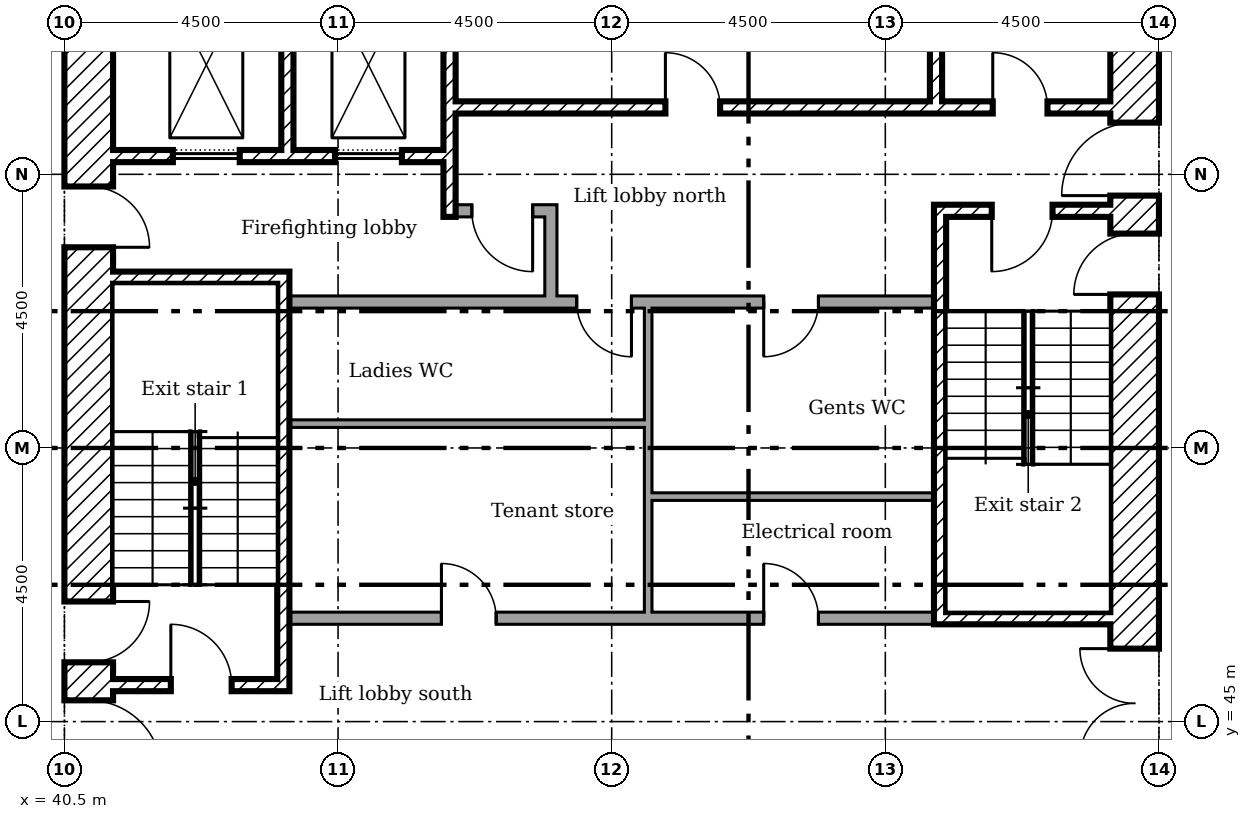
"""IFC4 building model, lengths in metres.
Left out: names, types, materials, properties, quantities, classifications, styles, units other than length and angle.
Written with IfcOpenShell. Run it as: python <this file> out.ifc"""

import sys

from ifc_helpers import new_model, si_unit, direction, frame, frame_2d, origin, place, context, subcontext, project, spatial, rectangle, extrude, element, fill, save


model = new_model("IFC4")
c1 = context("Model", 3, precision=1e-05, world=origin(), true_north=direction((0.0, 1.0)))
c2 = subcontext(c1, "Body", "Model", "MODEL_VIEW")
j1 = project(units=[si_unit("LENGTHUNIT", "METRE"), si_unit("PLANEANGLEUNIT", "RADIAN")], contexts=[c1])
p1 = place(None, origin())
s1 = spatial("IfcSite", under=j1, at=p1, CompositionType="ELEMENT")
p2 = place(p1, origin())
s2 = spatial("IfcBuilding", under=s1, at=p2, CompositionType="ELEMENT")
p3 = place(p2, frame((0.0, 0.0, 54.6)))
s3 = spatial("IfcBuildingStorey", under=s2, at=p3, CompositionType="ELEMENT", Elevation=54.6)
p4 = place(p3, frame((58.1, 40.5, 0.0), z_axis=(0.0, 0.0, 1.0), x_axis=(0.0, 1.0, 0.0)))
e1 = element("IfcWall", 1, at=p4, inside=s3, PredefinedType="SHEAR", context=c2, shape_type="SweptSolid", body=[
    extrude(rectangle(XDim=18.0, YDim=0.8, at=frame_2d((9.0, 0.0))), origin(), (0.0, 0.0, 1.0), 3.35),
])
p5 = place(p4, frame((13.15, 0.0, 0.0)))
e2 = element("IfcOpeningElement", 2, at=p5, cuts=e1, PredefinedType="OPENING", context=c2, shape_type="SweptSolid", body=[
    extrude(rectangle(XDim=1.2, YDim=2.1, at=frame_2d((0.6, 1.05))), frame((0.0, 0.41, 0.0), z_axis=(0.0, -1.0, 0.0), x_axis=(1.0, 0.0, 0.0)), (0.0, 0.0, 1.0), 0.82),
])
p6 = place(p4, frame((3.9, 0.0, 0.0)))
e3 = element("IfcOpeningElement", 3, at=p6, cuts=e1, PredefinedType="OPENING", context=c2, shape_type="SweptSolid", body=[
    extrude(rectangle(XDim=1.8, YDim=2.1, at=frame_2d((0.9, 1.05))), frame((0.0, 0.41, 0.0), z_axis=(0.0, -1.0, 0.0), x_axis=(1.0, 0.0, 0.0)), (0.0, 0.0, 1.0), 0.82),
])
p7 = place(p4, frame((11.525, 0.0, 0.0)))
e4 = element("IfcOpeningElement", 4, at=p7, cuts=e1, PredefinedType="OPENING", context=c2, shape_type="SweptSolid", body=[
    extrude(rectangle(XDim=1.0, YDim=2.1, at=frame_2d((0.5, 1.05))), frame((0.0, 0.41, 0.0), z_axis=(0.0, -1.0, 0.0), x_axis=(1.0, 0.0, 0.0)), (0.0, 0.0, 1.0), 0.82),
])
p8 = place(p3, frame((40.9, 40.5, 0.0), z_axis=(0.0, 0.0, 1.0), x_axis=(0.0, 1.0, 0.0)))
e5 = element("IfcWall", 5, at=p8, inside=s3, PredefinedType="SHEAR", context=c2, shape_type="SweptSolid", body=[
    extrude(rectangle(XDim=18.0, YDim=0.8, at=frame_2d((9.0, 0.0))), origin(), (0.0, 0.0, 1.0), 3.35),
])
p9 = place(p8, frame((3.65, 0.0, 0.0)))
e6 = element("IfcOpeningElement", 6, at=p9, cuts=e5, PredefinedType="OPENING", context=c2, shape_type="SweptSolid", body=[
    extrude(rectangle(XDim=1.2, YDim=2.1, at=frame_2d((0.6, 1.05))), frame((0.0, 0.41, 0.0), z_axis=(0.0, -1.0, 0.0), x_axis=(1.0, 0.0, 0.0)), (0.0, 0.0, 1.0), 0.82),
])
p10 = place(p8, frame((5.475, 0.0, 0.0)))
e7 = element("IfcOpeningElement", 7, at=p10, cuts=e5, PredefinedType="OPENING", context=c2, shape_type="SweptSolid", body=[
    extrude(rectangle(XDim=1.0, YDim=2.1, at=frame_2d((0.5, 1.05))), frame((0.0, 0.41, 0.0), z_axis=(0.0, -1.0, 0.0), x_axis=(1.0, 0.0, 0.0)), (0.0, 0.0, 1.0), 0.82),
])
p11 = place(p8, frame((12.3, 0.0, 0.0)))
e8 = element("IfcOpeningElement", 8, at=p11, cuts=e5, PredefinedType="OPENING", context=c2, shape_type="SweptSolid", body=[
    extrude(rectangle(XDim=1.0, YDim=2.1, at=frame_2d((0.5, 1.05))), frame((0.0, 0.41, 0.0), z_axis=(0.0, -1.0, 0.0), x_axis=(1.0, 0.0, 0.0)), (0.0, 0.0, 1.0), 0.82),
])
p12 = place(p3, frame((44.167, 57.7, 0.0), z_axis=(0.0, 0.0, 1.0), x_axis=(0.0, -1.0, 0.0)))
e9 = element("IfcWall", 9, at=p12, inside=s3, PredefinedType="SHEAR", context=c2, shape_type="SweptSolid", body=[
    extrude(rectangle(XDim=3.3, YDim=0.2, at=frame_2d((1.65, 0.0))), origin(), (0.0, 0.0, 1.0), 3.35),
])
p13 = place(p3, frame((46.833, 57.7, 0.0), z_axis=(0.0, 0.0, 1.0), x_axis=(0.0, -1.0, 0.0)))
e10 = element("IfcWall", 10, at=p13, inside=s3, PredefinedType="SHEAR", context=c2, shape_type="SweptSolid", body=[
    extrude(rectangle(XDim=4.4, YDim=0.2, at=frame_2d((2.2, 0.0))), origin(), (0.0, 0.0, 1.0), 3.35),
])
p14 = place(p3, frame((54.833, 57.7, 0.0), z_axis=(0.0, 0.0, 1.0), x_axis=(0.0, -1.0, 0.0)))
e11 = element("IfcWall", 11, at=p14, inside=s3, PredefinedType="SHEAR", context=c2, shape_type="SweptSolid", body=[
    extrude(rectangle(XDim=2.5, YDim=0.2, at=frame_2d((1.25, 0.0))), origin(), (0.0, 0.0, 1.0), 3.35),
])
p15 = place(p3, frame((48.5, 51.9, 0.0), z_axis=(0.0, 0.0, 1.0), x_axis=(0.0, 1.0, 0.0)))
e12 = element("IfcWall", 12, at=p15, inside=s3, PredefinedType="PARTITIONING", context=c2, shape_type="SweptSolid", body=[
    extrude(rectangle(XDim=1.6, YDim=0.2, at=frame_2d((0.8, 0.0))), origin(), (0.0, 0.0, 1.0), 3.35),
])
p16 = place(p3, frame((46.933, 53.4, 0.0)))
e13 = element("IfcWall", 13, at=p16, inside=s3, PredefinedType="PARTITIONING", context=c2, shape_type="SweptSolid", body=[
    extrude(rectangle(XDim=1.467, YDim=0.2, at=frame_2d((0.733, 0.0))), origin(), (0.0, 0.0, 1.0), 3.35),
])
p17 = place(p16, frame((0.267, 0.0, 0.0)))
e14 = element("IfcOpeningElement", 14, at=p17, cuts=e13, PredefinedType="OPENING", context=c2, shape_type="SweptSolid", body=[
    extrude(rectangle(XDim=1.0, YDim=2.1, at=frame_2d((0.5, 1.05))), frame((0.0, 0.11, 0.0), z_axis=(0.0, -1.0, 0.0), x_axis=(1.0, 0.0, 0.0)), (0.0, 0.0, 1.0), 0.22),
])
p18 = place(p3, frame((46.933, 55.1, 0.0)))
e15 = element("IfcWall", 15, at=p18, inside=s3, PredefinedType="SHEAR", context=c2, shape_type="SweptSolid", body=[
    extrude(rectangle(XDim=10.767, YDim=0.2, at=frame_2d((5.383, 0.0))), origin(), (0.0, 0.0, 1.0), 3.35),
])
p19 = place(p18, frame((8.833, 0.0, 0.0)))
e16 = element("IfcOpeningElement", 16, at=p19, cuts=e15, PredefinedType="OPENING", context=c2, shape_type="SweptSolid", body=[
    extrude(rectangle(XDim=0.9, YDim=2.1, at=frame_2d((0.45, 1.05))), frame((0.0, 0.11, 0.0), z_axis=(0.0, -1.0, 0.0), x_axis=(1.0, 0.0, 0.0)), (0.0, 0.0, 1.0), 0.22),
])
p20 = place(p18, frame((3.45, 0.0, 0.0)))
e17 = element("IfcOpeningElement", 17, at=p20, cuts=e15, PredefinedType="OPENING", context=c2, shape_type="SweptSolid", body=[
    extrude(rectangle(XDim=0.9, YDim=2.1, at=frame_2d((0.45, 1.05))), frame((0.0, 0.11, 0.0), z_axis=(0.0, -1.0, 0.0), x_axis=(1.0, 0.0, 0.0)), (0.0, 0.0, 1.0), 0.22),
])
p21 = place(p3, frame((41.3, 54.3, 0.0)))
e18 = element("IfcWall", 18, at=p21, inside=s3, PredefinedType="SHEAR", context=c2, shape_type="SweptSolid", body=[
    extrude(rectangle(XDim=5.433, YDim=0.2, at=frame_2d((2.717, 0.0))), origin(), (0.0, 0.0, 1.0), 3.35),
])
p22 = place(p21, frame((0.983, 0.0, 0.0)))
e19 = element("IfcOpeningElement", 19, at=p22, cuts=e18, PredefinedType="OPENING", context=c2, shape_type="SweptSolid", body=[
    extrude(rectangle(XDim=1.1, YDim=2.1, at=frame_2d((0.55, 1.05))), frame((0.0, 0.11, 0.0), z_axis=(0.0, -1.0, 0.0), x_axis=(1.0, 0.0, 0.0)), (0.0, 0.0, 1.0), 0.22),
])
p23 = place(p21, frame((3.65, 0.0, 0.0)))
e20 = element("IfcOpeningElement", 20, at=p23, cuts=e18, PredefinedType="OPENING", context=c2, shape_type="SweptSolid", body=[
    extrude(rectangle(XDim=1.1, YDim=2.1, at=frame_2d((0.55, 1.05))), frame((0.0, 0.11, 0.0), z_axis=(0.0, -1.0, 0.0), x_axis=(1.0, 0.0, 0.0)), (0.0, 0.0, 1.0), 0.22),
])
p24 = place(p3, frame((44.1, 45.5, 0.0), z_axis=(0.0, 0.0, 1.0), x_axis=(0.0, 1.0, 0.0)))
e21 = element("IfcWall", 21, at=p24, inside=s3, PredefinedType="SHEAR", context=c2, shape_type="SweptSolid", body=[
    extrude(rectangle(XDim=6.9, YDim=0.2, at=frame_2d((3.45, 0.0))), origin(), (0.0, 0.0, 1.0), 3.35),
])
p25 = place(p3, frame((41.3, 52.3, 0.0)))
e22 = element("IfcWall", 22, at=p25, inside=s3, PredefinedType="SHEAR", context=c2, shape_type="SweptSolid", body=[
    extrude(rectangle(XDim=2.7, YDim=0.2, at=frame_2d((1.35, 0.0))), origin(), (0.0, 0.0, 1.0), 3.35),
])
p26 = place(p3, frame((41.3, 45.6, 0.0)))
e23 = element("IfcWall", 23, at=p26, inside=s3, PredefinedType="SHEAR", context=c2, shape_type="SweptSolid", body=[
    extrude(rectangle(XDim=2.7, YDim=0.2, at=frame_2d((1.35, 0.0))), origin(), (0.0, 0.0, 1.0), 3.35),
])
p27 = place(p26, frame((0.95, 0.0, 0.0)))
e24 = element("IfcOpeningElement", 24, at=p27, cuts=e23, PredefinedType="OPENING", context=c2, shape_type="SweptSolid", body=[
    extrude(rectangle(XDim=1.0, YDim=2.1, at=frame_2d((0.5, 1.05))), frame((0.0, 0.11, 0.0), z_axis=(0.0, -1.0, 0.0), x_axis=(1.0, 0.0, 0.0)), (0.0, 0.0, 1.0), 0.22),
])
p28 = place(p3, frame((54.8, 53.4, 0.0)))
e25 = element("IfcWall", 25, at=p28, inside=s3, PredefinedType="SHEAR", context=c2, shape_type="SweptSolid", body=[
    extrude(rectangle(XDim=2.9, YDim=0.2, at=frame_2d((1.45, 0.0))), origin(), (0.0, 0.0, 1.0), 3.35),
])
p29 = place(p28, frame((0.95, 0.0, 0.0)))
e26 = element("IfcOpeningElement", 26, at=p29, cuts=e25, PredefinedType="OPENING", context=c2, shape_type="SweptSolid", body=[
    extrude(rectangle(XDim=1.0, YDim=2.1, at=frame_2d((0.5, 1.05))), frame((0.0, 0.11, 0.0), z_axis=(0.0, -1.0, 0.0), x_axis=(1.0, 0.0, 0.0)), (0.0, 0.0, 1.0), 0.22),
])
p30 = place(p3, frame((54.8, 46.7, 0.0)))
e27 = element("IfcWall", 27, at=p30, inside=s3, PredefinedType="SHEAR", context=c2, shape_type="SweptSolid", body=[
    extrude(rectangle(XDim=2.9, YDim=0.2, at=frame_2d((1.45, 0.0))), origin(), (0.0, 0.0, 1.0), 3.35),
])
p31 = place(p3, frame((54.9, 46.8, 0.0), z_axis=(0.0, 0.0, 1.0), x_axis=(0.0, 1.0, 0.0)))
e28 = element("IfcWall", 28, at=p31, inside=s3, PredefinedType="SHEAR", context=c2, shape_type="SweptSolid", body=[
    extrude(rectangle(XDim=6.5, YDim=0.2, at=frame_2d((3.25, 0.0))), origin(), (0.0, 0.0, 1.0), 3.35),
])
p32 = place(p3, frame((44.2, 51.9, 0.0)))
e29 = element("IfcWall", 29, at=p32, inside=s3, PredefinedType="PARTITIONING", context=c2, shape_type="SweptSolid", body=[
    extrude(rectangle(XDim=10.6, YDim=0.2, at=frame_2d((5.3, 0.0))), origin(), (0.0, 0.0, 1.0), 3.35),
])
p33 = place(p32, frame((4.725, 0.0, 0.0)))
e30 = element("IfcOpeningElement", 30, at=p33, cuts=e29, PredefinedType="OPENING", context=c2, shape_type="SweptSolid", body=[
    extrude(rectangle(XDim=0.9, YDim=2.1, at=frame_2d((0.45, 1.05))), frame((0.0, 0.11, 0.0), z_axis=(0.0, -1.0, 0.0), x_axis=(1.0, 0.0, 0.0)), (0.0, 0.0, 1.0), 0.22),
])
p34 = place(p32, frame((7.8, 0.0, 0.0)))
e31 = element("IfcOpeningElement", 31, at=p34, cuts=e29, PredefinedType="OPENING", context=c2, shape_type="SweptSolid", body=[
    extrude(rectangle(XDim=0.9, YDim=2.1, at=frame_2d((0.45, 1.05))), frame((0.0, 0.11, 0.0), z_axis=(0.0, -1.0, 0.0), x_axis=(1.0, 0.0, 0.0)), (0.0, 0.0, 1.0), 0.22),
])
p35 = place(p3, frame((44.2, 46.7, 0.0)))
e32 = element("IfcWall", 32, at=p35, inside=s3, PredefinedType="PARTITIONING", context=c2, shape_type="SweptSolid", body=[
    extrude(rectangle(XDim=10.6, YDim=0.2, at=frame_2d((5.3, 0.0))), origin(), (0.0, 0.0, 1.0), 3.35),
])
p36 = place(p35, frame((2.5, 0.0, 0.0)))
e33 = element("IfcOpeningElement", 33, at=p36, cuts=e32, PredefinedType="OPENING", context=c2, shape_type="SweptSolid", body=[
    extrude(rectangle(XDim=0.9, YDim=2.1, at=frame_2d((0.45, 1.05))), frame((0.0, 0.11, 0.0), z_axis=(0.0, -1.0, 0.0), x_axis=(1.0, 0.0, 0.0)), (0.0, 0.0, 1.0), 0.22),
])
p37 = place(p35, frame((7.8, 0.0, 0.0)))
e34 = element("IfcOpeningElement", 34, at=p37, cuts=e32, PredefinedType="OPENING", context=c2, shape_type="SweptSolid", body=[
    extrude(rectangle(XDim=0.9, YDim=2.1, at=frame_2d((0.45, 1.05))), frame((0.0, 0.11, 0.0), z_axis=(0.0, -1.0, 0.0), x_axis=(1.0, 0.0, 0.0)), (0.0, 0.0, 1.0), 0.22),
])
p38 = place(p3, frame((50.1, 46.8, 0.0), z_axis=(0.0, 0.0, 1.0), x_axis=(0.0, 1.0, 0.0)))
e35 = element("IfcWall", 35, at=p38, inside=s3, PredefinedType="PARTITIONING", context=c2, shape_type="SweptSolid", body=[
    extrude(rectangle(XDim=1.962, YDim=0.125, at=frame_2d((0.981, 0.0))), origin(), (0.0, 0.0, 1.0), 3.35),
])
p39 = place(p3, frame((54.8, 48.7, 0.0), z_axis=(0.0, 0.0, 1.0), x_axis=(-1.0, 0.0, 0.0)))
e36 = element("IfcWall", 36, at=p39, inside=s3, PredefinedType="PARTITIONING", context=c2, shape_type="SweptSolid", body=[
    extrude(rectangle(XDim=4.637, YDim=0.125, at=frame_2d((2.319, 0.0))), origin(), (0.0, 0.0, 1.0), 3.35),
])
p40 = place(p3, frame((50.1, 48.7, 0.0), z_axis=(0.0, 0.0, 1.0), x_axis=(0.0, 1.0, 0.0)))
e37 = element("IfcWall", 37, at=p40, inside=s3, PredefinedType="PARTITIONING", context=c2, shape_type="SweptSolid", body=[
    extrude(rectangle(XDim=1.262, YDim=0.125, at=frame_2d((0.631, 0.0))), origin(), (0.0, 0.0, 1.0), 3.35),
])
p41 = place(p3, frame((50.038, 49.9, 0.0), z_axis=(0.0, 0.0, 1.0), x_axis=(-1.0, 0.0, 0.0)))
e38 = element("IfcWall", 38, at=p41, inside=s3, PredefinedType="PARTITIONING", context=c2, shape_type="SweptSolid", body=[
    extrude(rectangle(XDim=5.838, YDim=0.125, at=frame_2d((2.919, 0.0))), origin(), (0.0, 0.0, 1.0), 3.35),
])
p42 = place(p3, frame((50.1, 49.9, 0.0), z_axis=(0.0, 0.0, 1.0), x_axis=(0.0, 1.0, 0.0)))
e39 = element("IfcWall", 39, at=p42, inside=s3, PredefinedType="PARTITIONING", context=c2, shape_type="SweptSolid", body=[
    extrude(rectangle(XDim=1.9, YDim=0.125, at=frame_2d((0.95, 0.0))), origin(), (0.0, 0.0, 1.0), 3.35),
])
p43 = place(p5, origin())
e40 = element("IfcDoor", 40, at=p43, inside=s3, OperationType="SINGLE_SWING_RIGHT", PredefinedType="DOOR", context=c2, shape_type="SweptSolid", body=[
    extrude(rectangle(XDim=1.2, YDim=2.1, at=frame_2d((0.6, 1.05))), frame((0.0, 0.025, 0.0), z_axis=(0.0, -1.0, 0.0), x_axis=(1.0, 0.0, 0.0)), (0.0, 0.0, 1.0), 0.05),
])
fill(e2, e40)
p44 = place(p6, origin())
e41 = element("IfcDoor", 41, at=p44, inside=s3, OperationType="DOUBLE_DOOR_SINGLE_SWING", PredefinedType="DOOR", context=c2, shape_type="SweptSolid", body=[
    extrude(rectangle(XDim=1.8, YDim=2.1, at=frame_2d((0.9, 1.05))), frame((0.0, 0.025, 0.0), z_axis=(0.0, -1.0, 0.0), x_axis=(1.0, 0.0, 0.0)), (0.0, 0.0, 1.0), 0.05),
])
fill(e3, e41)
p45 = place(p9, frame((1.2, 0.0, 0.0), x_axis=(-1.0, 0.0, 0.0)))
e42 = element("IfcDoor", 42, at=p45, inside=s3, OperationType="SINGLE_SWING_LEFT", PredefinedType="DOOR", context=c2, shape_type="SweptSolid", body=[
    extrude(rectangle(XDim=1.2, YDim=2.1, at=frame_2d((0.6, 1.05))), frame((0.0, 0.025, 0.0), z_axis=(0.0, -1.0, 0.0), x_axis=(1.0, 0.0, 0.0)), (0.0, 0.0, 1.0), 0.05),
])
fill(e6, e42)
p46 = place(p27, origin())
e43 = element("IfcDoor", 43, at=p46, inside=s3, OperationType="SINGLE_SWING_RIGHT", PredefinedType="DOOR", context=c2, shape_type="SweptSolid", body=[
    extrude(rectangle(XDim=1.0, YDim=2.1, at=frame_2d((0.5, 1.05))), frame((0.0, 0.025, 0.0), z_axis=(0.0, -1.0, 0.0), x_axis=(1.0, 0.0, 0.0)), (0.0, 0.0, 1.0), 0.05),
])
fill(e24, e43)
p47 = place(p10, frame((1.0, 0.0, 0.0), x_axis=(-1.0, 0.0, 0.0)))
e44 = element("IfcDoor", 44, at=p47, inside=s3, OperationType="SINGLE_SWING_RIGHT", PredefinedType="DOOR", context=c2, shape_type="SweptSolid", body=[
    extrude(rectangle(XDim=1.0, YDim=2.1, at=frame_2d((0.5, 1.05))), frame((0.0, 0.025, 0.0), z_axis=(0.0, -1.0, 0.0), x_axis=(1.0, 0.0, 0.0)), (0.0, 0.0, 1.0), 0.05),
])
fill(e7, e44)
p48 = place(p29, frame((1.0, 0.0, 0.0), x_axis=(-1.0, 0.0, 0.0)))
e45 = element("IfcDoor", 45, at=p48, inside=s3, OperationType="SINGLE_SWING_LEFT", PredefinedType="DOOR", context=c2, shape_type="SweptSolid", body=[
    extrude(rectangle(XDim=1.0, YDim=2.1, at=frame_2d((0.5, 1.05))), frame((0.0, 0.025, 0.0), z_axis=(0.0, -1.0, 0.0), x_axis=(1.0, 0.0, 0.0)), (0.0, 0.0, 1.0), 0.05),
])
fill(e26, e45)
p49 = place(p7, origin())
e46 = element("IfcDoor", 46, at=p49, inside=s3, OperationType="SINGLE_SWING_RIGHT", PredefinedType="DOOR", context=c2, shape_type="SweptSolid", body=[
    extrude(rectangle(XDim=1.0, YDim=2.1, at=frame_2d((0.5, 1.05))), frame((0.0, 0.025, 0.0), z_axis=(0.0, -1.0, 0.0), x_axis=(1.0, 0.0, 0.0)), (0.0, 0.0, 1.0), 0.05),
])
fill(e4, e46)
p50 = place(p17, frame((1.0, 0.0, 0.0), x_axis=(-1.0, 0.0, 0.0)))
e47 = element("IfcDoor", 47, at=p50, inside=s3, OperationType="SINGLE_SWING_RIGHT", PredefinedType="DOOR", context=c2, shape_type="SweptSolid", body=[
    extrude(rectangle(XDim=1.0, YDim=2.1, at=frame_2d((0.5, 1.05))), frame((0.0, 0.025, 0.0), z_axis=(0.0, -1.0, 0.0), x_axis=(1.0, 0.0, 0.0)), (0.0, 0.0, 1.0), 0.05),
])
fill(e14, e47)
p51 = place(p11, frame((1.0, 0.0, 0.0), x_axis=(-1.0, 0.0, 0.0)))
e48 = element("IfcDoor", 48, at=p51, inside=s3, OperationType="SINGLE_SWING_LEFT", PredefinedType="DOOR", context=c2, shape_type="SweptSolid", body=[
    extrude(rectangle(XDim=1.0, YDim=2.1, at=frame_2d((0.5, 1.05))), frame((0.0, 0.025, 0.0), z_axis=(0.0, -1.0, 0.0), x_axis=(1.0, 0.0, 0.0)), (0.0, 0.0, 1.0), 0.05),
])
fill(e8, e48)
p52 = place(p19, origin())
e49 = element("IfcDoor", 49, at=p52, inside=s3, OperationType="SINGLE_SWING_RIGHT", PredefinedType="DOOR", context=c2, shape_type="SweptSolid", body=[
    extrude(rectangle(XDim=0.9, YDim=2.1, at=frame_2d((0.45, 1.05))), frame((0.0, 0.025, 0.0), z_axis=(0.0, -1.0, 0.0), x_axis=(1.0, 0.0, 0.0)), (0.0, 0.0, 1.0), 0.05),
])
fill(e16, e49)
p53 = place(p20, origin())
e50 = element("IfcDoor", 50, at=p53, inside=s3, OperationType="SINGLE_SWING_RIGHT", PredefinedType="DOOR", context=c2, shape_type="SweptSolid", body=[
    extrude(rectangle(XDim=0.9, YDim=2.1, at=frame_2d((0.45, 1.05))), frame((0.0, 0.025, 0.0), z_axis=(0.0, -1.0, 0.0), x_axis=(1.0, 0.0, 0.0)), (0.0, 0.0, 1.0), 0.05),
])
fill(e17, e50)
p54 = place(p36, origin())
e51 = element("IfcDoor", 51, at=p54, inside=s3, OperationType="SINGLE_SWING_RIGHT", PredefinedType="DOOR", context=c2, shape_type="SweptSolid", body=[
    extrude(rectangle(XDim=0.9, YDim=2.1, at=frame_2d((0.45, 1.05))), frame((0.0, 0.025, 0.0), z_axis=(0.0, -1.0, 0.0), x_axis=(1.0, 0.0, 0.0)), (0.0, 0.0, 1.0), 0.05),
])
fill(e33, e51)
p55 = place(p33, frame((0.9, 0.0, 0.0), x_axis=(-1.0, 0.0, 0.0)))
e52 = element("IfcDoor", 52, at=p55, inside=s3, OperationType="SINGLE_SWING_RIGHT", PredefinedType="DOOR", context=c2, shape_type="SweptSolid", body=[
    extrude(rectangle(XDim=0.9, YDim=2.1, at=frame_2d((0.45, 1.05))), frame((0.0, 0.025, 0.0), z_axis=(0.0, -1.0, 0.0), x_axis=(1.0, 0.0, 0.0)), (0.0, 0.0, 1.0), 0.05),
])
fill(e30, e52)
p56 = place(p37, origin())
e53 = element("IfcDoor", 53, at=p56, inside=s3, OperationType="SINGLE_SWING_RIGHT", PredefinedType="DOOR", context=c2, shape_type="SweptSolid", body=[
    extrude(rectangle(XDim=0.9, YDim=2.1, at=frame_2d((0.45, 1.05))), frame((0.0, 0.025, 0.0), z_axis=(0.0, -1.0, 0.0), x_axis=(1.0, 0.0, 0.0)), (0.0, 0.0, 1.0), 0.05),
])
fill(e34, e53)
p57 = place(p34, frame((0.9, 0.0, 0.0), x_axis=(-1.0, 0.0, 0.0)))
e54 = element("IfcDoor", 54, at=p57, inside=s3, OperationType="SINGLE_SWING_LEFT", PredefinedType="DOOR", context=c2, shape_type="SweptSolid", body=[
    extrude(rectangle(XDim=0.9, YDim=2.1, at=frame_2d((0.45, 1.05))), frame((0.0, 0.025, 0.0), z_axis=(0.0, -1.0, 0.0), x_axis=(1.0, 0.0, 0.0)), (0.0, 0.0, 1.0), 0.05),
])
fill(e31, e54)
p58 = place(p22, origin())
e55 = element("IfcDoor", 55, at=p58, inside=s3, OperationType="SLIDING_TO_LEFT", PredefinedType="DOOR", context=c2, shape_type="SweptSolid", body=[
    extrude(rectangle(XDim=1.1, YDim=2.1, at=frame_2d((0.55, 1.05))), frame((0.0, 0.025, 0.0), z_axis=(0.0, -1.0, 0.0), x_axis=(1.0, 0.0, 0.0)), (0.0, 0.0, 1.0), 0.05),
])
fill(e19, e55)
p59 = place(p23, origin())
e56 = element("IfcDoor", 56, at=p59, inside=s3, OperationType="SLIDING_TO_LEFT", PredefinedType="DOOR", context=c2, shape_type="SweptSolid", body=[
    extrude(rectangle(XDim=1.1, YDim=2.1, at=frame_2d((0.55, 1.05))), frame((0.0, 0.025, 0.0), z_axis=(0.0, -1.0, 0.0), x_axis=(1.0, 0.0, 0.0)), (0.0, 0.0, 1.0), 0.05),
])
fill(e20, e56)
save(model, sys.argv[1])
